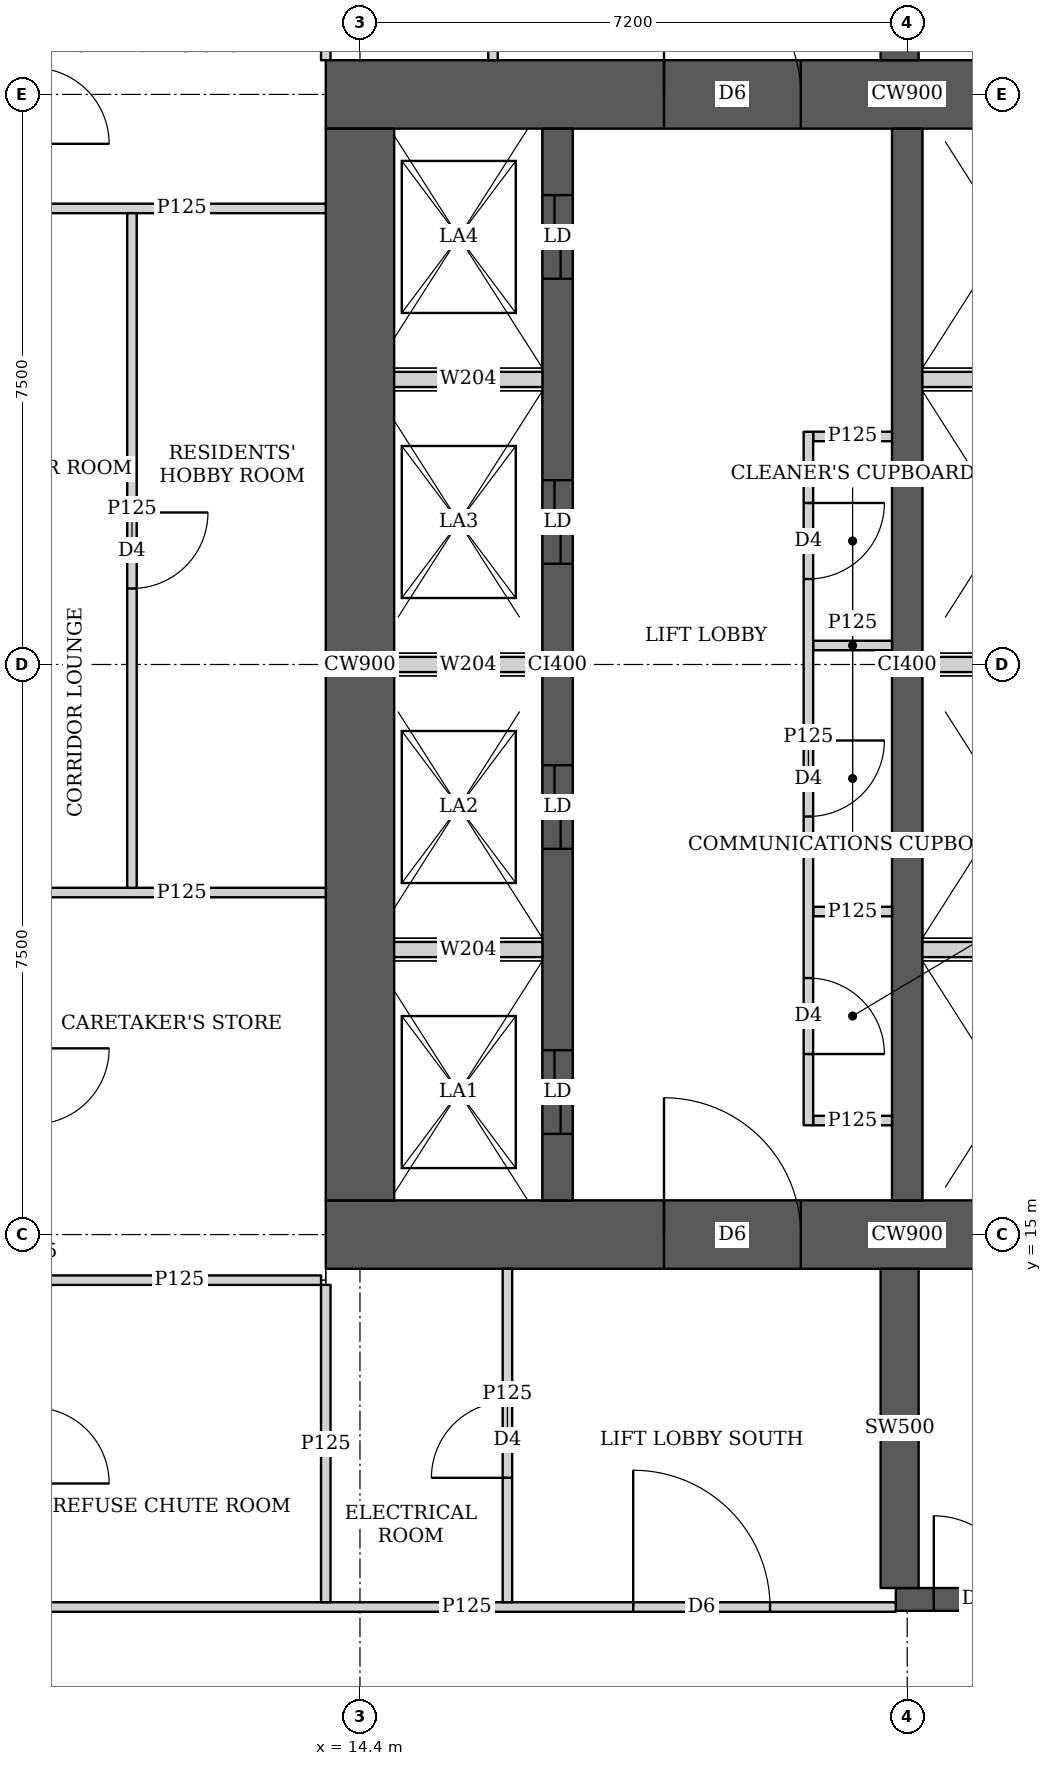
"""IFC4 building model, lengths in metres.
Left out: names, types, materials, properties, quantities, classifications, styles, units other than length and angle.
Written with IfcOpenShell. Run it as: python <this file> out.ifc"""

import sys

from ifc_helpers import new_model, si_unit, direction, frame, frame_2d, origin, place, context, subcontext, project, spatial, rectangle, extrude, element, fill, save


model = new_model("IFC4")
c1 = context("Model", 3, precision=1e-05, world=origin(), true_north=direction((0.0, 1.0)))
c2 = subcontext(c1, "Body", "Model", "MODEL_VIEW")
j1 = project(units=[si_unit("LENGTHUNIT", "METRE"), si_unit("PLANEANGLEUNIT", "RADIAN")], contexts=[c1])
p1 = place(None, origin())
s1 = spatial("IfcSite", under=j1, at=p1, CompositionType="ELEMENT")
p2 = place(p1, origin())
s2 = spatial("IfcBuilding", under=s1, at=p2, CompositionType="ELEMENT")
p3 = place(p2, frame((0.0, 0.0, 100.4)))
s3 = spatial("IfcBuildingStorey", under=s2, at=p3, CompositionType="ELEMENT", Elevation=100.4)
p4 = place(p3, frame((13.95, 15.0, 0.0), z_axis=(0.0, 0.0, 1.0), x_axis=(1.0, 0.0, 0.0)))
e1 = element("IfcWall", 1, at=p4, inside=s3, PredefinedType="SHEAR", context=c2, shape_type="SweptSolid", body=[
    extrude(rectangle(XDim=15.3, YDim=0.9, at=frame_2d((7.65, 0.0))), origin(), (0.0, 0.0, 1.0), 3.75),
])
p5 = place(p4, frame((4.45, 0.0, 0.0)))
e2 = element("IfcOpeningElement", 2, at=p5, cuts=e1, PredefinedType="OPENING", context=c2, shape_type="SweptSolid", body=[
    extrude(rectangle(XDim=1.8, YDim=2.1, at=frame_2d((0.9, 1.05))), frame((0.0, 0.46, 0.0), z_axis=(0.0, -1.0, 0.0), x_axis=(1.0, 0.0, 0.0)), (0.0, 0.0, 1.0), 0.92),
])
p6 = place(p4, frame((10.7, 0.0, 0.0)))
e3 = element("IfcOpeningElement", 3, at=p6, cuts=e1, PredefinedType="OPENING", context=c2, shape_type="SweptSolid", body=[
    extrude(rectangle(XDim=1.1, YDim=2.1, at=frame_2d((0.55, 1.05))), frame((0.0, 0.46, 0.0), z_axis=(0.0, -1.0, 0.0), x_axis=(1.0, 0.0, 0.0)), (0.0, 0.0, 1.0), 0.92),
])
p7 = place(p3, frame((13.95, 30.0, 0.0), z_axis=(0.0, 0.0, 1.0), x_axis=(1.0, 0.0, 0.0)))
e4 = element("IfcWall", 4, at=p7, inside=s3, PredefinedType="SHEAR", context=c2, shape_type="SweptSolid", body=[
    extrude(rectangle(XDim=15.3, YDim=0.9, at=frame_2d((7.65, 0.0))), origin(), (0.0, 0.0, 1.0), 3.75),
])
p8 = place(p7, frame((4.45, 0.0, 0.0)))
e5 = element("IfcOpeningElement", 5, at=p8, cuts=e4, PredefinedType="OPENING", context=c2, shape_type="SweptSolid", body=[
    extrude(rectangle(XDim=1.8, YDim=2.1, at=frame_2d((0.9, 1.05))), frame((0.0, 0.46, 0.0), z_axis=(0.0, -1.0, 0.0), x_axis=(1.0, 0.0, 0.0)), (0.0, 0.0, 1.0), 0.92),
])
p9 = place(p7, frame((10.7, 0.0, 0.0)))
e6 = element("IfcOpeningElement", 6, at=p9, cuts=e4, PredefinedType="OPENING", context=c2, shape_type="SweptSolid", body=[
    extrude(rectangle(XDim=1.1, YDim=2.1, at=frame_2d((0.55, 1.05))), frame((0.0, 0.46, 0.0), z_axis=(0.0, -1.0, 0.0), x_axis=(1.0, 0.0, 0.0)), (0.0, 0.0, 1.0), 0.92),
])
p10 = place(p3, frame((14.4, 15.45, 0.0), z_axis=(0.0, 0.0, 1.0), x_axis=(0.0, 1.0, 0.0)))
e7 = element("IfcWall", 7, at=p10, inside=s3, PredefinedType="SHEAR", context=c2, shape_type="SweptSolid", body=[
    extrude(rectangle(XDim=14.1, YDim=0.9, at=frame_2d((7.05, 0.0))), origin(), (0.0, 0.0, 1.0), 3.75),
])
p11 = place(p3, frame((17.0, 15.45, 0.0), z_axis=(0.0, 0.0, 1.0), x_axis=(0.0, 1.0, 0.0)))
e8 = element("IfcWall", 8, at=p11, inside=s3, PredefinedType="SHEAR", context=c2, shape_type="SweptSolid", body=[
    extrude(rectangle(XDim=14.1, YDim=0.4, at=frame_2d((7.05, 0.0))), origin(), (0.0, 0.0, 1.0), 3.75),
])
p12 = place(p11, frame((0.875, 0.0, 0.0)))
e9 = element("IfcOpeningElement", 9, at=p12, cuts=e8, PredefinedType="OPENING", context=c2, shape_type="SweptSolid", body=[
    extrude(rectangle(XDim=1.1, YDim=2.1, at=frame_2d((0.55, 1.05))), frame((0.0, 0.21, 0.0), z_axis=(0.0, -1.0, 0.0), x_axis=(1.0, 0.0, 0.0)), (0.0, 0.0, 1.0), 0.42),
])
p13 = place(p11, frame((4.625, 0.0, 0.0)))
e10 = element("IfcOpeningElement", 10, at=p13, cuts=e8, PredefinedType="OPENING", context=c2, shape_type="SweptSolid", body=[
    extrude(rectangle(XDim=1.1, YDim=2.1, at=frame_2d((0.55, 1.05))), frame((0.0, 0.21, 0.0), z_axis=(0.0, -1.0, 0.0), x_axis=(1.0, 0.0, 0.0)), (0.0, 0.0, 1.0), 0.42),
])
p14 = place(p11, frame((8.375, 0.0, 0.0)))
e11 = element("IfcOpeningElement", 11, at=p14, cuts=e8, PredefinedType="OPENING", context=c2, shape_type="SweptSolid", body=[
    extrude(rectangle(XDim=1.1, YDim=2.1, at=frame_2d((0.55, 1.05))), frame((0.0, 0.21, 0.0), z_axis=(0.0, -1.0, 0.0), x_axis=(1.0, 0.0, 0.0)), (0.0, 0.0, 1.0), 0.42),
])
p15 = place(p11, frame((12.125, 0.0, 0.0)))
e12 = element("IfcOpeningElement", 12, at=p15, cuts=e8, PredefinedType="OPENING", context=c2, shape_type="SweptSolid", body=[
    extrude(rectangle(XDim=1.1, YDim=2.1, at=frame_2d((0.55, 1.05))), frame((0.0, 0.21, 0.0), z_axis=(0.0, -1.0, 0.0), x_axis=(1.0, 0.0, 0.0)), (0.0, 0.0, 1.0), 0.42),
])
p16 = place(p3, frame((21.6, 15.45, 0.0), z_axis=(0.0, 0.0, 1.0), x_axis=(0.0, 1.0, 0.0)))
e13 = element("IfcWall", 13, at=p16, inside=s3, PredefinedType="SHEAR", context=c2, shape_type="SweptSolid", body=[
    extrude(rectangle(XDim=14.1, YDim=0.4, at=frame_2d((7.05, 0.0))), origin(), (0.0, 0.0, 1.0), 3.75),
])
p17 = place(p3, frame((21.45, 10.2, 0.0), z_axis=(0.0, 0.0, 1.0), x_axis=(1.0, 0.0, 0.0)))
e14 = element("IfcWall", 14, at=p17, inside=s3, PredefinedType="SHEAR", context=c2, shape_type="SweptSolid", body=[
    extrude(rectangle(XDim=7.5, YDim=0.3, at=frame_2d((3.75, 0.0))), origin(), (0.0, 0.0, 1.0), 3.75),
])
p18 = place(p17, frame((0.5, 0.0, 0.0)))
e15 = element("IfcOpeningElement", 15, at=p18, cuts=e14, PredefinedType="OPENING", context=c2, shape_type="SweptSolid", body=[
    extrude(rectangle(XDim=1.1, YDim=2.1, at=frame_2d((0.55, 1.05))), frame((0.0, 0.16, 0.0), z_axis=(0.0, -1.0, 0.0), x_axis=(1.0, 0.0, 0.0)), (0.0, 0.0, 1.0), 0.32),
])
for number, where, z_axis, x_axis in (
    (16, (21.5, 10.35, 0.0), (0.0, 0.0, 1.0), (0.0, 1.0, 0.0)),
    (17, (21.5, 30.45, 0.0), (0.0, 0.0, 1.0), (0.0, 1.0, 0.0)),
):
    element("IfcWall", number, at=place(p3, frame(where, z_axis=z_axis, x_axis=x_axis)), inside=s3, PredefinedType="SHEAR", context=c2, shape_type="SweptSolid", body=[
        extrude(rectangle(XDim=4.2, YDim=0.5, at=frame_2d((2.1, 0.0))), origin(), (0.0, 0.0, 1.0), 3.75),
    ])
p19 = place(p3, frame((11.4, 19.562, 0.0), z_axis=(0.0, 0.0, 1.0), x_axis=(0.0, 1.0, 0.0)))
e18 = element("IfcWall", 18, at=p19, inside=s3, PredefinedType="PARTITIONING", context=c2, shape_type="SweptSolid", body=[
    extrude(rectangle(XDim=8.876, YDim=0.125, at=frame_2d((4.438, 0.0))), origin(), (0.0, 0.0, 1.0), 3.5),
])
p20 = place(p19, frame((3.938, 0.0, 0.0)))
e19 = element("IfcOpeningElement", 19, at=p20, cuts=e18, PredefinedType="OPENING", context=c2, shape_type="SweptSolid", body=[
    extrude(rectangle(XDim=1.0, YDim=2.1, at=frame_2d((0.5, 1.05))), frame((0.0, 0.073, 0.0), z_axis=(0.0, -1.0, 0.0), x_axis=(1.0, 0.0, 0.0)), (0.0, 0.0, 1.0), 0.145),
])
p21 = place(p3, frame((10.163, 14.4, 0.0), z_axis=(0.0, 0.0, 1.0), x_axis=(1.0, 0.0, 0.0)))
e20 = element("IfcWall", 20, at=p21, inside=s3, PredefinedType="PARTITIONING", context=c2, shape_type="SweptSolid", body=[
    extrude(rectangle(XDim=3.725, YDim=0.125, at=frame_2d((1.862, 0.0))), origin(), (0.0, 0.0, 1.0), 3.5),
])
for number, where, z_axis, x_axis in (
    (21, (10.163, 19.5, 0.0), (0.0, 0.0, 1.0), (1.0, 0.0, 0.0)),
    (22, (10.163, 28.5, 0.0), (0.0, 0.0, 1.0), (1.0, 0.0, 0.0)),
):
    element("IfcWall", number, at=place(p3, frame(where, z_axis=z_axis, x_axis=x_axis)), inside=s3, PredefinedType="PARTITIONING", context=c2, shape_type="SweptSolid", body=[
        extrude(rectangle(XDim=3.787, YDim=0.125, at=frame_2d((1.894, 0.0))), origin(), (0.0, 0.0, 1.0), 3.5),
    ])
p22 = place(p3, frame((13.95, 10.163, 0.0), z_axis=(0.0, 0.0, 1.0), x_axis=(0.0, 1.0, 0.0)))
e23 = element("IfcWall", 23, at=p22, inside=s3, PredefinedType="PARTITIONING", context=c2, shape_type="SweptSolid", body=[
    extrude(rectangle(XDim=4.175, YDim=0.125, at=frame_2d((2.087, 0.0))), origin(), (0.0, 0.0, 1.0), 3.5),
])
p23 = place(p3, frame((13.95, 30.45, 0.0), z_axis=(0.0, 0.0, 1.0), x_axis=(0.0, 1.0, 0.0)))
e24 = element("IfcWall", 24, at=p23, inside=s3, PredefinedType="PARTITIONING", context=c2, shape_type="SweptSolid", body=[
    extrude(rectangle(XDim=4.387, YDim=0.125, at=frame_2d((2.193, 0.0))), origin(), (0.0, 0.0, 1.0), 3.5),
])
p24 = place(p3, frame((10.163, 10.1, 0.0), z_axis=(0.0, 0.0, 1.0), x_axis=(1.0, 0.0, 0.0)))
e25 = element("IfcWall", 25, at=p24, inside=s3, PredefinedType="PARTITIONING", context=c2, shape_type="SweptSolid", body=[
    extrude(rectangle(XDim=11.287, YDim=0.125, at=frame_2d((5.644, 0.0))), origin(), (0.0, 0.0, 1.0), 3.5),
])
p25 = place(p24, frame((7.832, 0.0, 0.0)))
e26 = element("IfcOpeningElement", 26, at=p25, cuts=e25, PredefinedType="OPENING", context=c2, shape_type="SweptSolid", body=[
    extrude(rectangle(XDim=1.8, YDim=2.1, at=frame_2d((0.9, 1.05))), frame((0.0, 0.073, 0.0), z_axis=(0.0, -1.0, 0.0), x_axis=(1.0, 0.0, 0.0)), (0.0, 0.0, 1.0), 0.145),
])
p26 = place(p3, frame((16.34, 10.163, 0.0), z_axis=(0.0, 0.0, 1.0), x_axis=(0.0, 1.0, 0.0)))
e27 = element("IfcWall", 27, at=p26, inside=s3, PredefinedType="PARTITIONING", context=c2, shape_type="SweptSolid", body=[
    extrude(rectangle(XDim=4.387, YDim=0.125, at=frame_2d((2.193, 0.0))), origin(), (0.0, 0.0, 1.0), 3.5),
])
p27 = place(p26, frame((1.637, 0.0, 0.0)))
e28 = element("IfcOpeningElement", 28, at=p27, cuts=e27, PredefinedType="OPENING", context=c2, shape_type="SweptSolid", body=[
    extrude(rectangle(XDim=1.0, YDim=2.1, at=frame_2d((0.5, 1.05))), frame((0.0, 0.073, 0.0), z_axis=(0.0, -1.0, 0.0), x_axis=(1.0, 0.0, 0.0)), (0.0, 0.0, 1.0), 0.145),
])
p28 = place(p3, frame((16.15, 30.45, 0.0), z_axis=(0.0, 0.0, 1.0), x_axis=(0.0, 1.0, 0.0)))
e29 = element("IfcWall", 29, at=p28, inside=s3, PredefinedType="PARTITIONING", context=c2, shape_type="SweptSolid", body=[
    extrude(rectangle(XDim=4.387, YDim=0.125, at=frame_2d((2.193, 0.0))), origin(), (0.0, 0.0, 1.0), 3.5),
])
p29 = place(p28, frame((1.75, 0.0, 0.0)))
e30 = element("IfcOpeningElement", 30, at=p29, cuts=e29, PredefinedType="OPENING", context=c2, shape_type="SweptSolid", body=[
    extrude(rectangle(XDim=1.0, YDim=2.1, at=frame_2d((0.5, 1.05))), frame((0.0, 0.073, 0.0), z_axis=(0.0, -1.0, 0.0), x_axis=(1.0, 0.0, 0.0)), (0.0, 0.0, 1.0), 0.145),
])
p30 = place(p3, frame((20.3, 16.438, 0.0), z_axis=(0.0, 0.0, 1.0), x_axis=(0.0, 1.0, 0.0)))
e31 = element("IfcWall", 31, at=p30, inside=s3, PredefinedType="PARTITIONING", context=c2, shape_type="SweptSolid", body=[
    extrude(rectangle(XDim=9.124, YDim=0.125, at=frame_2d((4.562, 0.0))), origin(), (0.0, 0.0, 1.0), 3.5),
])
p31 = place(p30, frame((0.937, 0.0, 0.0)))
e32 = element("IfcOpeningElement", 32, at=p31, cuts=e31, PredefinedType="OPENING", context=c2, shape_type="SweptSolid", body=[
    extrude(rectangle(XDim=1.0, YDim=2.1, at=frame_2d((0.5, 1.05))), frame((0.0, 0.073, 0.0), z_axis=(0.0, -1.0, 0.0), x_axis=(1.0, 0.0, 0.0)), (0.0, 0.0, 1.0), 0.145),
])
p32 = place(p30, frame((4.062, 0.0, 0.0)))
e33 = element("IfcOpeningElement", 33, at=p32, cuts=e31, PredefinedType="OPENING", context=c2, shape_type="SweptSolid", body=[
    extrude(rectangle(XDim=1.0, YDim=2.1, at=frame_2d((0.5, 1.05))), frame((0.0, 0.073, 0.0), z_axis=(0.0, -1.0, 0.0), x_axis=(1.0, 0.0, 0.0)), (0.0, 0.0, 1.0), 0.145),
])
p33 = place(p30, frame((7.187, 0.0, 0.0)))
e34 = element("IfcOpeningElement", 34, at=p33, cuts=e31, PredefinedType="OPENING", context=c2, shape_type="SweptSolid", body=[
    extrude(rectangle(XDim=1.0, YDim=2.1, at=frame_2d((0.5, 1.05))), frame((0.0, 0.073, 0.0), z_axis=(0.0, -1.0, 0.0), x_axis=(1.0, 0.0, 0.0)), (0.0, 0.0, 1.0), 0.145),
])
for number, where, z_axis, x_axis in (
    (35, (20.363, 16.5, 0.0), (0.0, 0.0, 1.0), (1.0, 0.0, 0.0)),
    (36, (20.363, 25.5, 0.0), (0.0, 0.0, 1.0), (1.0, 0.0, 0.0)),
    (37, (20.363, 19.25, 0.0), (0.0, 0.0, 1.0), (1.0, 0.0, 0.0)),
    (38, (20.363, 22.75, 0.0), (0.0, 0.0, 1.0), (1.0, 0.0, 0.0)),
):
    element("IfcWall", number, at=place(p3, frame(where, z_axis=z_axis, x_axis=x_axis)), inside=s3, PredefinedType="PARTITIONING", context=c2, shape_type="SweptSolid", body=[
        extrude(rectangle(XDim=1.037, YDim=0.125, at=frame_2d((0.519, 0.0))), origin(), (0.0, 0.0, 1.0), 3.5),
    ])
p34 = place(p3, frame((14.85, 18.75, 0.0), z_axis=(0.0, 0.0, 1.0), x_axis=(1.0, 0.0, 0.0)))
e39 = element("IfcWall", 39, at=p34, inside=s3, PredefinedType="SOLIDWALL", context=c2, shape_type="SweptSolid", body=[
    extrude(rectangle(XDim=1.95, YDim=0.2, at=frame_2d((0.975, 0.0))), origin(), (0.0, 0.0, 1.0), 3.5),
])
p35 = place(p3, frame((21.8, 18.75, 0.0), z_axis=(0.0, 0.0, 1.0), x_axis=(1.0, 0.0, 0.0)))
e40 = element("IfcWall", 40, at=p35, inside=s3, PredefinedType="SOLIDWALL", context=c2, shape_type="SweptSolid", body=[
    extrude(rectangle(XDim=2.2, YDim=0.2, at=frame_2d((1.1, 0.0))), origin(), (0.0, 0.0, 1.0), 3.5),
])
p36 = place(p3, frame((14.85, 22.5, 0.0), z_axis=(0.0, 0.0, 1.0), x_axis=(1.0, 0.0, 0.0)))
e41 = element("IfcWall", 41, at=p36, inside=s3, PredefinedType="SOLIDWALL", context=c2, shape_type="SweptSolid", body=[
    extrude(rectangle(XDim=1.95, YDim=0.2, at=frame_2d((0.975, 0.0))), origin(), (0.0, 0.0, 1.0), 3.5),
])
p37 = place(p3, frame((21.8, 22.5, 0.0), z_axis=(0.0, 0.0, 1.0), x_axis=(1.0, 0.0, 0.0)))
e42 = element("IfcWall", 42, at=p37, inside=s3, PredefinedType="SOLIDWALL", context=c2, shape_type="SweptSolid", body=[
    extrude(rectangle(XDim=2.2, YDim=0.2, at=frame_2d((1.1, 0.0))), origin(), (0.0, 0.0, 1.0), 3.5),
])
p38 = place(p3, frame((14.85, 26.25, 0.0), z_axis=(0.0, 0.0, 1.0), x_axis=(1.0, 0.0, 0.0)))
e43 = element("IfcWall", 43, at=p38, inside=s3, PredefinedType="SOLIDWALL", context=c2, shape_type="SweptSolid", body=[
    extrude(rectangle(XDim=1.95, YDim=0.2, at=frame_2d((0.975, 0.0))), origin(), (0.0, 0.0, 1.0), 3.5),
])
p39 = place(p3, frame((21.8, 26.25, 0.0), z_axis=(0.0, 0.0, 1.0), x_axis=(1.0, 0.0, 0.0)))
e44 = element("IfcWall", 44, at=p39, inside=s3, PredefinedType="SOLIDWALL", context=c2, shape_type="SweptSolid", body=[
    extrude(rectangle(XDim=2.2, YDim=0.2, at=frame_2d((1.1, 0.0))), origin(), (0.0, 0.0, 1.0), 3.5),
])
p40 = place(p20, origin())
e45 = element("IfcDoor", 45, at=p40, inside=s3, OperationType="SINGLE_SWING_LEFT", PredefinedType="DOOR", context=c2, shape_type="SweptSolid", body=[
    extrude(rectangle(XDim=1.0, YDim=2.1, at=frame_2d((0.5, 1.05))), frame((0.0, 0.025, 0.0), z_axis=(0.0, -1.0, 0.0), x_axis=(1.0, 0.0, 0.0)), (0.0, 0.0, 1.0), 0.05),
])
fill(e19, e45)
p41 = place(p27, origin())
e46 = element("IfcDoor", 46, at=p41, inside=s3, OperationType="SINGLE_SWING_LEFT", PredefinedType="DOOR", context=c2, shape_type="SweptSolid", body=[
    extrude(rectangle(XDim=1.0, YDim=2.1, at=frame_2d((0.5, 1.05))), frame((0.0, 0.025, 0.0), z_axis=(0.0, -1.0, 0.0), x_axis=(1.0, 0.0, 0.0)), (0.0, 0.0, 1.0), 0.05),
])
fill(e28, e46)
p42 = place(p25, origin())
e47 = element("IfcDoor", 47, at=p42, inside=s3, OperationType="DOUBLE_DOOR_SINGLE_SWING", PredefinedType="DOOR", context=c2, shape_type="SweptSolid", body=[
    extrude(rectangle(XDim=1.8, YDim=2.1, at=frame_2d((0.9, 1.05))), frame((0.0, 0.025, 0.0), z_axis=(0.0, -1.0, 0.0), x_axis=(1.0, 0.0, 0.0)), (0.0, 0.0, 1.0), 0.05),
])
fill(e26, e47)
p43 = place(p31, origin())
e48 = element("IfcDoor", 48, at=p43, inside=s3, OperationType="SINGLE_SWING_RIGHT", PredefinedType="DOOR", context=c2, shape_type="SweptSolid", body=[
    extrude(rectangle(XDim=1.0, YDim=2.1, at=frame_2d((0.5, 1.05))), frame((0.0, 0.025, 0.0), z_axis=(0.0, -1.0, 0.0), x_axis=(1.0, 0.0, 0.0)), (0.0, 0.0, 1.0), 0.05),
])
fill(e32, e48)
p44 = place(p32, origin())
e49 = element("IfcDoor", 49, at=p44, inside=s3, OperationType="SINGLE_SWING_LEFT", PredefinedType="DOOR", context=c2, shape_type="SweptSolid", body=[
    extrude(rectangle(XDim=1.0, YDim=2.1, at=frame_2d((0.5, 1.05))), frame((0.0, 0.025, 0.0), z_axis=(0.0, -1.0, 0.0), x_axis=(1.0, 0.0, 0.0)), (0.0, 0.0, 1.0), 0.05),
])
fill(e33, e49)
p45 = place(p33, origin())
e50 = element("IfcDoor", 50, at=p45, inside=s3, OperationType="SINGLE_SWING_LEFT", PredefinedType="DOOR", context=c2, shape_type="SweptSolid", body=[
    extrude(rectangle(XDim=1.0, YDim=2.1, at=frame_2d((0.5, 1.05))), frame((0.0, 0.025, 0.0), z_axis=(0.0, -1.0, 0.0), x_axis=(1.0, 0.0, 0.0)), (0.0, 0.0, 1.0), 0.05),
])
fill(e34, e50)
p46 = place(p5, origin())
e51 = element("IfcDoor", 51, at=p46, inside=s3, OperationType="DOUBLE_DOOR_SINGLE_SWING", PredefinedType="DOOR", context=c2, shape_type="SweptSolid", body=[
    extrude(rectangle(XDim=1.8, YDim=2.1, at=frame_2d((0.9, 1.05))), frame((0.0, 0.025, 0.0), z_axis=(0.0, -1.0, 0.0), x_axis=(1.0, 0.0, 0.0)), (0.0, 0.0, 1.0), 0.05),
])
fill(e2, e51)
p47 = place(p8, origin())
e52 = element("IfcDoor", 52, at=p47, inside=s3, OperationType="DOUBLE_DOOR_SINGLE_SWING", PredefinedType="DOOR", context=c2, shape_type="SweptSolid", body=[
    extrude(rectangle(XDim=1.8, YDim=2.1, at=frame_2d((0.9, 1.05))), frame((0.0, 0.025, 0.0), z_axis=(0.0, -1.0, 0.0), x_axis=(1.0, 0.0, 0.0)), (0.0, 0.0, 1.0), 0.05),
])
fill(e5, e52)
p48 = place(p12, origin())
e53 = element("IfcDoor", 53, at=p48, inside=s3, OperationType="DOUBLE_DOOR_SLIDING", PredefinedType="DOOR", context=c2, shape_type="SweptSolid", body=[
    extrude(rectangle(XDim=1.1, YDim=2.1, at=frame_2d((0.55, 1.05))), frame((0.0, 0.025, 0.0), z_axis=(0.0, -1.0, 0.0), x_axis=(1.0, 0.0, 0.0)), (0.0, 0.0, 1.0), 0.05),
])
fill(e9, e53)
p49 = place(p13, origin())
e54 = element("IfcDoor", 54, at=p49, inside=s3, OperationType="DOUBLE_DOOR_SLIDING", PredefinedType="DOOR", context=c2, shape_type="SweptSolid", body=[
    extrude(rectangle(XDim=1.1, YDim=2.1, at=frame_2d((0.55, 1.05))), frame((0.0, 0.025, 0.0), z_axis=(0.0, -1.0, 0.0), x_axis=(1.0, 0.0, 0.0)), (0.0, 0.0, 1.0), 0.05),
])
fill(e10, e54)
p50 = place(p14, origin())
e55 = element("IfcDoor", 55, at=p50, inside=s3, OperationType="DOUBLE_DOOR_SLIDING", PredefinedType="DOOR", context=c2, shape_type="SweptSolid", body=[
    extrude(rectangle(XDim=1.1, YDim=2.1, at=frame_2d((0.55, 1.05))), frame((0.0, 0.025, 0.0), z_axis=(0.0, -1.0, 0.0), x_axis=(1.0, 0.0, 0.0)), (0.0, 0.0, 1.0), 0.05),
])
fill(e11, e55)
p51 = place(p15, origin())
e56 = element("IfcDoor", 56, at=p51, inside=s3, OperationType="DOUBLE_DOOR_SLIDING", PredefinedType="DOOR", context=c2, shape_type="SweptSolid", body=[
    extrude(rectangle(XDim=1.1, YDim=2.1, at=frame_2d((0.55, 1.05))), frame((0.0, 0.025, 0.0), z_axis=(0.0, -1.0, 0.0), x_axis=(1.0, 0.0, 0.0)), (0.0, 0.0, 1.0), 0.05),
])
fill(e12, e56)
p52 = place(p18, origin())
e57 = element("IfcDoor", 57, at=p52, inside=s3, OperationType="SINGLE_SWING_LEFT", PredefinedType="DOOR", context=c2, shape_type="SweptSolid", body=[
    extrude(rectangle(XDim=1.1, YDim=2.1, at=frame_2d((0.55, 1.05))), frame((0.0, 0.025, 0.0), z_axis=(0.0, -1.0, 0.0), x_axis=(1.0, 0.0, 0.0)), (0.0, 0.0, 1.0), 0.05),
])
fill(e15, e57)
save(model, sys.argv[1])
